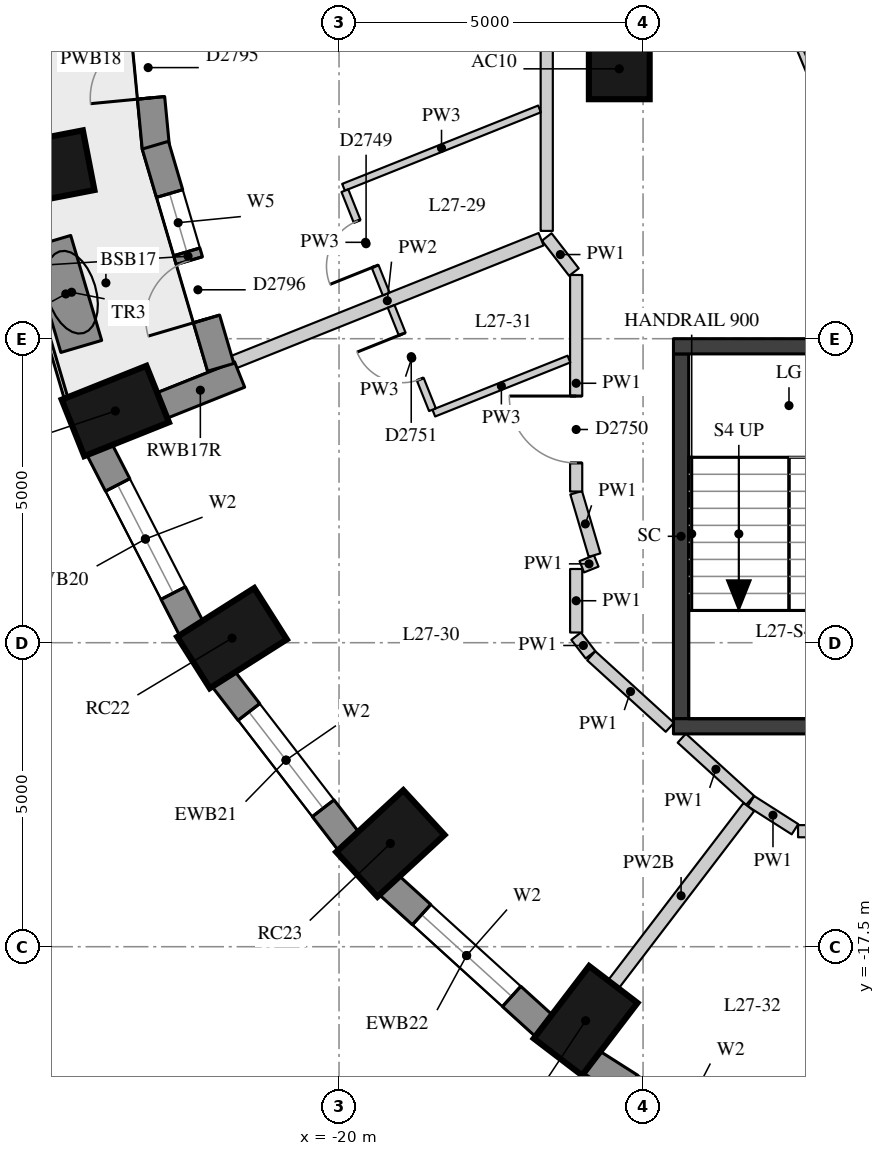
"""IFC4 building model, lengths in metres.
Left out: names, types, materials, properties, quantities, classifications, styles, units other than length and angle.
Written with IfcOpenShell. Run it as: python <this file> out.ifc"""

import sys

from ifc_helpers import new_model, si_unit, direction, frame, frame_2d, origin, origin_2d, place, context, subcontext, project, spatial, rectangle, extrude, element, fill, save


model = new_model("IFC4")
c1 = context("Model", 3, precision=1e-05, world=origin(), true_north=direction((0.0, 1.0)))
c2 = subcontext(c1, "Body", "Model", "MODEL_VIEW")
j1 = project(units=[si_unit("LENGTHUNIT", "METRE"), si_unit("PLANEANGLEUNIT", "RADIAN")], contexts=[c1])
p1 = place(None, origin())
s1 = spatial("IfcSite", under=j1, at=p1, CompositionType="ELEMENT")
p2 = place(p1, origin())
s2 = spatial("IfcBuilding", under=s1, at=p2, CompositionType="ELEMENT")
p3 = place(p2, frame((0.0, 0.0, 98.8)))
s3 = spatial("IfcBuildingStorey", under=s2, at=p3, CompositionType="ELEMENT", Elevation=98.8)
for number, where, z_axis, x_axis in (
    (1, (-24.854, -4.707, 0.0), (0.0, 0.0, 1.0), (-0.982, -0.19, 0.0)),
    (2, (-23.679, -8.689, 0.0), (0.0, 0.0, 1.0), (-0.929, -0.371, 0.0)),
    (3, (-21.76, -12.425, 0.0), (0.0, 0.0, 1.0), (-0.845, -0.536, 0.0)),
    (4, (-19.156, -15.802, 0.0), (0.0, 0.0, 1.0), (-0.735, -0.678, 0.0)),
    (5, (-15.945, -18.717, 0.0), (0.0, 0.0, 1.0), (-0.607, -0.795, 0.0)),
):
    element("IfcColumn", number, at=place(p3, frame(where, z_axis=z_axis, x_axis=x_axis)), inside=s3, PredefinedType="COLUMN", context=c2, shape_type="SweptSolid", body=[
        extrude(rectangle(XDim=1.5, YDim=1.0, at=origin_2d()), origin(), (0.0, 0.0, 1.0), 3.3),
    ])
p4 = place(p3, frame((-15.391, -3.062, 0.0), z_axis=(0.0, 0.0, 1.0), x_axis=(1.0, 0.0, 0.0)))
e6 = element("IfcColumn", 6, at=p4, inside=s3, PredefinedType="COLUMN", context=c2, shape_type="SweptSolid", body=[
    extrude(rectangle(XDim=1.0, YDim=1.0, at=origin_2d()), origin(), (0.0, 0.0, 1.0), 3.3),
])
p5 = place(p3, frame((-23.945, -9.312, 0.0), z_axis=(0.0, 0.0, 1.0), x_axis=(0.456828186229, -0.889554949549, 0.0)))
e7 = element("IfcWall", 7, at=p5, inside=s3, PredefinedType="SOLIDWALL", context=c2, shape_type="SweptSolid", body=[
    extrude(rectangle(XDim=3.333, YDim=0.45, at=frame_2d((1.667, 0.0))), origin(), (0.0, 0.0, 1.0), 3.02),
])
p6 = place(p5, frame((0.666, 0.0, 0.4)))
e8 = element("IfcOpeningElement", 8, at=p6, cuts=e7, PredefinedType="OPENING", context=c2, shape_type="SweptSolid", body=[
    extrude(rectangle(XDim=2.0, YDim=1.75, at=frame_2d((1.0, 0.875))), frame((0.0, 0.235, 0.0), z_axis=(0.0, -1.0, 0.0), x_axis=(1.0, 0.0, 0.0)), (0.0, 0.0, 1.0), 0.47),
])
p7 = place(p3, frame((-21.908, -13.087, 0.0), z_axis=(0.0, 0.0, 1.0), x_axis=(0.610693945156, -0.791866721961, 0.0)))
e9 = element("IfcWall", 9, at=p7, inside=s3, PredefinedType="SOLIDWALL", context=c2, shape_type="SweptSolid", body=[
    extrude(rectangle(XDim=3.395, YDim=0.45, at=frame_2d((1.697, 0.0))), origin(), (0.0, 0.0, 1.0), 3.02),
])
p8 = place(p7, frame((0.697, 0.0, 0.4)))
e10 = element("IfcOpeningElement", 10, at=p8, cuts=e9, PredefinedType="OPENING", context=c2, shape_type="SweptSolid", body=[
    extrude(rectangle(XDim=2.0, YDim=1.75, at=frame_2d((1.0, 0.875))), frame((0.0, 0.235, 0.0), z_axis=(0.0, -1.0, 0.0), x_axis=(1.0, 0.0, 0.0)), (0.0, 0.0, 1.0), 0.47),
])
p9 = place(p3, frame((-19.184, -16.481, 0.0), z_axis=(0.0, 0.0, 1.0), x_axis=(0.740364106106, -0.672206062446, 0.0)))
e11 = element("IfcWall", 11, at=p9, inside=s3, PredefinedType="SOLIDWALL", context=c2, shape_type="SweptSolid", body=[
    extrude(rectangle(XDim=3.464, YDim=0.45, at=frame_2d((1.732, 0.0))), origin(), (0.0, 0.0, 1.0), 3.02),
])
p10 = place(p9, frame((0.732, 0.0, 0.4)))
e12 = element("IfcOpeningElement", 12, at=p10, cuts=e11, PredefinedType="OPENING", context=c2, shape_type="SweptSolid", body=[
    extrude(rectangle(XDim=2.0, YDim=1.75, at=frame_2d((1.0, 0.875))), frame((0.0, 0.235, 0.0), z_axis=(0.0, -1.0, 0.0), x_axis=(1.0, 0.0, 0.0)), (0.0, 0.0, 1.0), 0.47),
])
p11 = place(p3, frame((-15.856, -19.392, 0.0), z_axis=(0.0, 0.0, 1.0), x_axis=(0.843891947083, -0.53651317006, 0.0)))
e13 = element("IfcWall", 13, at=p11, inside=s3, PredefinedType="SOLIDWALL", context=c2, shape_type="SweptSolid", body=[
    extrude(rectangle(XDim=3.532, YDim=0.45, at=frame_2d((1.766, 0.0))), origin(), (0.0, 0.0, 1.0), 3.02),
])
p12 = place(p11, frame((0.766, 0.0, 0.4)))
e14 = element("IfcOpeningElement", 14, at=p12, cuts=e13, PredefinedType="OPENING", context=c2, shape_type="SweptSolid", body=[
    extrude(rectangle(XDim=2.0, YDim=1.75, at=frame_2d((1.0, 0.875))), frame((0.0, 0.235, 0.0), z_axis=(0.0, -1.0, 0.0), x_axis=(1.0, 0.0, 0.0)), (0.0, 0.0, 1.0), 0.47),
])
p13 = place(p3, frame((-22.926, -8.605, 0.0), z_axis=(0.0, 0.0, 1.0), x_axis=(0.928549333349, 0.371209018665, 0.0)))
e15 = element("IfcWall", 15, at=p13, inside=s3, PredefinedType="SOLIDWALL", context=c2, shape_type="SweptSolid", body=[
    extrude(rectangle(XDim=1.39, YDim=0.45, at=frame_2d((0.695, 0.0))), origin(), (0.0, 0.0, 1.0), 3.02),
])
p14 = place(p3, frame((-23.376, -0.578, 0.0), z_axis=(0.0, 0.0, 1.0), x_axis=(0.095646267275, -0.995415386437, 0.0)))
e16 = element("IfcWall", 16, at=p14, inside=s3, PredefinedType="SOLIDWALL", context=c2, shape_type="SweptSolid", body=[
    extrude(rectangle(XDim=3.798, YDim=0.45, at=frame_2d((1.899, 0.0))), origin(), (0.0, 0.0, 1.0), 3.02),
])
p15 = place(p14, frame((0.824, 0.0, 0.4)))
e17 = element("IfcOpeningElement", 17, at=p15, cuts=e16, PredefinedType="OPENING", context=c2, shape_type="SweptSolid", body=[
    extrude(rectangle(XDim=1.0, YDim=1.75, at=frame_2d((0.5, 0.875))), frame((0.0, 0.235, 0.0), z_axis=(0.0, -1.0, 0.0), x_axis=(1.0, 0.0, 0.0)), (0.0, 0.0, 1.0), 0.47),
])
p16 = place(p14, frame((1.974, 0.0, 0.0)))
e18 = element("IfcOpeningElement", 18, at=p16, cuts=e16, PredefinedType="OPENING", context=c2, shape_type="SweptSolid", body=[
    extrude(rectangle(XDim=1.0, YDim=2.15, at=frame_2d((0.5, 1.075))), frame((0.0, 0.235, 0.0), z_axis=(0.0, -1.0, 0.0), x_axis=(1.0, 0.0, 0.0)), (0.0, 0.0, 1.0), 0.47),
])
p17 = place(p3, frame((-23.021, -4.317, 0.0), z_axis=(0.0, 0.0, 1.0), x_axis=(0.282391916129, -0.959299122123, 0.0)))
e19 = element("IfcWall", 19, at=p17, inside=s3, PredefinedType="SOLIDWALL", context=c2, shape_type="SweptSolid", body=[
    extrude(rectangle(XDim=3.808, YDim=0.45, at=frame_2d((1.904, 0.0))), origin(), (0.0, 0.0, 1.0), 3.02),
])
p18 = place(p17, frame((0.829, 0.0, 0.4)))
e20 = element("IfcOpeningElement", 20, at=p18, cuts=e19, PredefinedType="OPENING", context=c2, shape_type="SweptSolid", body=[
    extrude(rectangle(XDim=1.0, YDim=1.75, at=frame_2d((0.5, 0.875))), frame((0.0, 0.235, 0.0), z_axis=(0.0, -1.0, 0.0), x_axis=(1.0, 0.0, 0.0)), (0.0, 0.0, 1.0), 0.47),
])
p19 = place(p17, frame((1.979, 0.0, 0.0)))
e21 = element("IfcOpeningElement", 21, at=p19, cuts=e19, PredefinedType="OPENING", context=c2, shape_type="SweptSolid", body=[
    extrude(rectangle(XDim=1.0, YDim=2.15, at=frame_2d((0.5, 1.075))), frame((0.0, 0.235, 0.0), z_axis=(0.0, -1.0, 0.0), x_axis=(1.0, 0.0, 0.0)), (0.0, 0.0, 1.0), 0.47),
])
p20 = place(p3, frame((-24.749, -5.901, 0.0), z_axis=(0.0, 0.0, 1.0), x_axis=(0.283076786659, -0.959097248904, 0.0)))
e22 = element("IfcWall", 22, at=p20, inside=s3, PredefinedType="USERDEFINED", context=c2, shape_type="SweptSolid", body=[
    extrude(rectangle(XDim=1.8, YDim=0.7, at=frame_2d((0.9, 0.0))), origin(), (0.0, 0.0, 1.0), 0.75),
])
p21 = place(p3, frame((-14.375, -13.75, -0.28), z_axis=(0.0, 0.0, 1.0), x_axis=(0.0, 1.0, 0.0)))
e23 = element("IfcWall", 23, at=p21, inside=s3, PredefinedType="SHEAR", context=c2, shape_type="SweptSolid", body=[
    extrude(rectangle(XDim=6.0, YDim=0.25, at=frame_2d((3.0, 0.0))), origin(), (0.0, 0.0, 1.0), 3.3),
])
for number, where, z_axis, x_axis in (
    (24, (-14.5, -7.625, -0.28), (0.0, 0.0, 1.0), (1.0, 0.0, 0.0)),
    (25, (-14.5, -13.875, -0.28), (0.0, 0.0, 1.0), (1.0, 0.0, 0.0)),
):
    element("IfcWall", number, at=place(p3, frame(where, z_axis=z_axis, x_axis=x_axis)), inside=s3, PredefinedType="SHEAR", context=c2, shape_type="SweptSolid", body=[
        extrude(rectangle(XDim=5.2, YDim=0.25, at=frame_2d((2.6, 0.0))), origin(), (0.0, 0.0, 1.0), 3.3),
    ])
p22 = place(p3, frame((-14.56, -13.891, 0.0), z_axis=(0.0, 0.0, 1.0), x_axis=(-0.739440483737, 0.673221932954, 0.0)))
e26 = element("IfcWall", 26, at=p22, inside=s3, PredefinedType="PARTITIONING", context=c2, shape_type="SweptSolid", body=[
    extrude(rectangle(XDim=1.748, YDim=0.2, at=frame_2d((0.874, 0.0))), origin(), (0.0, 0.0, 1.0), 3.02),
])
p23 = place(p3, frame((-15.864, -12.699, 0.0), z_axis=(0.0, 0.0, 1.0), x_axis=(-0.61004607296, 0.792365943782, 0.0)))
e27 = element("IfcWall", 27, at=p23, inside=s3, PredefinedType="PARTITIONING", context=c2, shape_type="SweptSolid", body=[
    extrude(rectangle(XDim=0.387, YDim=0.2, at=frame_2d((0.193, 0.0))), origin(), (0.0, 0.0, 1.0), 3.02),
])
p24 = place(p3, frame((-16.1, -12.332, 0.0), z_axis=(0.0, 0.0, 1.0), x_axis=(0.0, 1.0, 0.0)))
e28 = element("IfcWall", 28, at=p24, inside=s3, PredefinedType="PARTITIONING", context=c2, shape_type="SweptSolid", body=[
    extrude(rectangle(XDim=1.045, YDim=0.2, at=frame_2d((0.522, 0.0))), origin(), (0.0, 0.0, 1.0), 3.02),
])
p25 = place(p3, frame((-16.007, -11.251, 0.0), z_axis=(0.0, 0.0, 1.0), x_axis=(0.928016011931, 0.372540308691, 0.0)))
e29 = element("IfcWall", 29, at=p25, inside=s3, PredefinedType="PARTITIONING", context=c2, shape_type="SweptSolid", body=[
    extrude(rectangle(XDim=0.256, YDim=0.2, at=frame_2d((0.128, 0.0))), origin(), (0.0, 0.0, 1.0), 3.02),
])
p26 = place(p3, frame((-15.798, -11.059, 0.0), z_axis=(0.0, 0.0, 1.0), x_axis=(-0.282883185669, 0.959154368841, 0.0)))
e30 = element("IfcWall", 30, at=p26, inside=s3, PredefinedType="PARTITIONING", context=c2, shape_type="SweptSolid", body=[
    extrude(rectangle(XDim=1.069, YDim=0.2, at=frame_2d((0.535, 0.0))), origin(), (0.0, 0.0, 1.0), 3.02),
])
p27 = place(p3, frame((-16.1, -10.013, 0.0), z_axis=(0.0, 0.0, 1.0), x_axis=(0.0, 1.0, 0.0)))
e31 = element("IfcWall", 31, at=p27, inside=s3, PredefinedType="PARTITIONING", context=c2, shape_type="SweptSolid", body=[
    extrude(rectangle(XDim=3.561, YDim=0.2, at=frame_2d((1.781, 0.0))), origin(), (0.0, 0.0, 1.0), 3.02),
])
p28 = place(p27, frame((0.47, 0.0, 0.0)))
e32 = element("IfcOpeningElement", 32, at=p28, cuts=e31, PredefinedType="OPENING", context=c2, shape_type="SweptSolid", body=[
    extrude(rectangle(XDim=1.1, YDim=2.1, at=frame_2d((0.55, 1.05))), frame((0.0, 0.11, 0.0), z_axis=(0.0, -1.0, 0.0), x_axis=(1.0, 0.0, 0.0)), (0.0, 0.0, 1.0), 0.22),
])
p29 = place(p3, frame((-16.137, -6.405, 0.0), z_axis=(0.0, 0.0, 1.0), x_axis=(-0.612388914667, 0.790556650211, 0.0)))
e33 = element("IfcWall", 33, at=p29, inside=s3, PredefinedType="PARTITIONING", context=c2, shape_type="SweptSolid", body=[
    extrude(rectangle(XDim=0.73, YDim=0.2, at=frame_2d((0.365, 0.0))), origin(), (0.0, 0.0, 1.0), 3.02),
])
p30 = place(p3, frame((-16.584, -5.727, 0.0), z_axis=(0.0, 0.0, 1.0), x_axis=(0.0, 1.0, 0.0)))
e34 = element("IfcWall", 34, at=p30, inside=s3, PredefinedType="PARTITIONING", context=c2, shape_type="SweptSolid", body=[
    extrude(rectangle(XDim=10.354, YDim=0.2, at=frame_2d((5.177, 0.0))), origin(), (0.0, 0.0, 1.0), 3.02),
])
p31 = place(p30, frame((3.439, 0.0, 0.0)))
e35 = element("IfcOpeningElement", 35, at=p31, cuts=e34, PredefinedType="OPENING", context=c2, shape_type="SweptSolid", body=[
    extrude(rectangle(XDim=1.1, YDim=2.1, at=frame_2d((0.55, 1.05))), frame((0.0, 0.11, 0.0), z_axis=(0.0, -1.0, 0.0), x_axis=(1.0, 0.0, 0.0)), (0.0, 0.0, 1.0), 0.22),
])
p32 = place(p3, frame((-8.0, -15.6, 0.0), z_axis=(0.0, 0.0, 1.0), x_axis=(-1.0, 0.0, 0.0)))
e36 = element("IfcWall", 36, at=p32, inside=s3, PredefinedType="PARTITIONING", context=c2, shape_type="SweptSolid", body=[
    extrude(rectangle(XDim=4.451, YDim=0.2, at=frame_2d((2.226, 0.0))), origin(), (0.0, 0.0, 1.0), 3.02),
])
p33 = place(p32, frame((2.442, 0.0, 0.0)))
e37 = element("IfcOpeningElement", 37, at=p33, cuts=e36, PredefinedType="OPENING", context=c2, shape_type="SweptSolid", body=[
    extrude(rectangle(XDim=0.9, YDim=2.1, at=frame_2d((0.45, 1.05))), frame((0.0, 0.11, 0.0), z_axis=(0.0, -1.0, 0.0), x_axis=(1.0, 0.0, 0.0)), (0.0, 0.0, 1.0), 0.22),
])
p34 = place(p3, frame((-12.501, -15.568, 0.0), z_axis=(0.0, 0.0, 1.0), x_axis=(-0.843169167706, 0.537648355926, 0.0)))
e38 = element("IfcWall", 38, at=p34, inside=s3, PredefinedType="PARTITIONING", context=c2, shape_type="SweptSolid", body=[
    extrude(rectangle(XDim=0.858, YDim=0.2, at=frame_2d((0.429, 0.0))), origin(), (0.0, 0.0, 1.0), 3.02),
])
p35 = place(p3, frame((-13.24, -15.093, 0.0), z_axis=(0.0, 0.0, 1.0), x_axis=(-0.739438095557, 0.673224556028, 0.0)))
e39 = element("IfcWall", 39, at=p35, inside=s3, PredefinedType="PARTITIONING", context=c2, shape_type="SweptSolid", body=[
    extrude(rectangle(XDim=1.519, YDim=0.2, at=frame_2d((0.76, 0.0))), origin(), (0.0, 0.0, 1.0), 3.02),
])
p36 = place(p3, frame((-21.736, -7.887, 0.0), z_axis=(0.0, 0.0, 1.0), x_axis=(0.928513770625, 0.371297963583, 0.0)))
e40 = element("IfcWall", 40, at=p36, inside=s3, PredefinedType="PARTITIONING", context=c2, shape_type="SweptSolid", body=[
    extrude(rectangle(XDim=5.448, YDim=0.22, at=frame_2d((2.724, 0.0))), origin(), (0.0, 0.0, 1.0), 3.02),
])
p37 = place(p3, frame((-15.489, -18.121, 0.0), z_axis=(0.0, 0.0, 1.0), x_axis=(0.607082337972, 0.794638933681, 0.0)))
e41 = element("IfcWall", 41, at=p37, inside=s3, PredefinedType="PARTITIONING", context=c2, shape_type="SweptSolid", body=[
    extrude(rectangle(XDim=3.672, YDim=0.22, at=frame_2d((1.836, 0.0))), origin(), (0.0, 0.0, 1.0), 2.57),
])
p38 = place(p3, frame((-16.703, -3.721, 0.0), z_axis=(0.0, 0.0, 1.0), x_axis=(-0.928539725362, -0.371233051362, 0.0)))
e42 = element("IfcWall", 42, at=p38, inside=s3, PredefinedType="PARTITIONING", context=c2, shape_type="SweptSolid", body=[
    extrude(rectangle(XDim=3.472, YDim=0.12, at=frame_2d((1.736, 0.0))), origin(), (0.0, 0.0, 1.0), 3.02),
])
p39 = place(p3, frame((-16.219, -7.835, 0.0), z_axis=(0.0, 0.0, 1.0), x_axis=(-0.928532951542, -0.371249993806, 0.0)))
e43 = element("IfcWall", 43, at=p39, inside=s3, PredefinedType="PARTITIONING", context=c2, shape_type="SweptSolid", body=[
    extrude(rectangle(XDim=2.394, YDim=0.12, at=frame_2d((1.197, 0.0))), origin(), (0.0, 0.0, 1.0), 3.02),
])
p40 = place(p3, frame((-19.904, -5.065, 0.0), z_axis=(0.0, 0.0, 1.0), x_axis=(0.371275666236, -0.92852268667, 0.0)))
e44 = element("IfcWall", 44, at=p40, inside=s3, PredefinedType="PARTITIONING", context=c2, shape_type="SweptSolid", body=[
    extrude(rectangle(XDim=1.83, YDim=0.12, at=frame_2d((0.915, 0.0))), origin(), (0.0, 0.0, 1.0), 3.02),
])
p41 = place(p40, frame((0.54, 0.0, 0.0)))
e45 = element("IfcOpeningElement", 45, at=p41, cuts=e44, PredefinedType="OPENING", context=c2, shape_type="SweptSolid", body=[
    extrude(rectangle(XDim=0.8, YDim=2.1, at=frame_2d((0.4, 1.05))), frame((0.0, 0.07, 0.0), z_axis=(0.0, -1.0, 0.0), x_axis=(1.0, 0.0, 0.0)), (0.0, 0.0, 1.0), 0.14),
])
p42 = place(p3, frame((-18.464, -8.668, 0.0), z_axis=(0.0, 0.0, 1.0), x_axis=(-0.371275666236, 0.92852268667, 0.0)))
e46 = element("IfcWall", 46, at=p42, inside=s3, PredefinedType="PARTITIONING", context=c2, shape_type="SweptSolid", body=[
    extrude(rectangle(XDim=1.83, YDim=0.12, at=frame_2d((0.915, 0.0))), origin(), (0.0, 0.0, 1.0), 3.02),
])
p43 = place(p42, frame((0.54, 0.0, 0.0)))
e47 = element("IfcOpeningElement", 47, at=p43, cuts=e46, PredefinedType="OPENING", context=c2, shape_type="SweptSolid", body=[
    extrude(rectangle(XDim=0.8, YDim=2.1, at=frame_2d((0.4, 1.05))), frame((0.0, 0.07, 0.0), z_axis=(0.0, -1.0, 0.0), x_axis=(1.0, 0.0, 0.0)), (0.0, 0.0, 1.0), 0.14),
])
p44 = place(p3, frame((-11.927, -3.927, 0.0), z_axis=(0.0, 0.0, 1.0), x_axis=(-0.382730523909, 0.923860025149, 0.0)))
e48 = element("IfcWall", 48, at=p44, inside=s3, PredefinedType="PARTITIONING", context=c2, shape_type="SweptSolid", body=[
    extrude(rectangle(XDim=4.251, YDim=0.1, at=frame_2d((2.125, 0.0))), origin(), (0.0, 0.0, 1.0), 3.02),
])
p45 = place(p6, origin())
e49 = element("IfcWindow", 49, at=p45, inside=s3, PartitioningType="SINGLE_PANEL", PredefinedType="WINDOW", context=c2, shape_type="SweptSolid", body=[
    extrude(rectangle(XDim=2.0, YDim=1.75, at=frame_2d((1.0, 0.875))), frame((0.0, 0.035, 0.0), z_axis=(0.0, -1.0, 0.0), x_axis=(1.0, 0.0, 0.0)), (0.0, 0.0, 1.0), 0.06),
])
fill(e8, e49)
p46 = place(p8, origin())
e50 = element("IfcWindow", 50, at=p46, inside=s3, PartitioningType="SINGLE_PANEL", PredefinedType="WINDOW", context=c2, shape_type="SweptSolid", body=[
    extrude(rectangle(XDim=2.0, YDim=1.75, at=frame_2d((1.0, 0.875))), frame((0.0, 0.035, 0.0), z_axis=(0.0, -1.0, 0.0), x_axis=(1.0, 0.0, 0.0)), (0.0, 0.0, 1.0), 0.06),
])
fill(e10, e50)
p47 = place(p10, origin())
e51 = element("IfcWindow", 51, at=p47, inside=s3, PartitioningType="SINGLE_PANEL", PredefinedType="WINDOW", context=c2, shape_type="SweptSolid", body=[
    extrude(rectangle(XDim=2.0, YDim=1.75, at=frame_2d((1.0, 0.875))), frame((0.0, 0.035, 0.0), z_axis=(0.0, -1.0, 0.0), x_axis=(1.0, 0.0, 0.0)), (0.0, 0.0, 1.0), 0.06),
])
fill(e12, e51)
p48 = place(p16, frame((1.0, 0.0, 0.0), z_axis=(0.0, 0.0, 1.0), x_axis=(-1.0, 0.0, 0.0)))
e52 = element("IfcDoor", 52, at=p48, inside=s3, OperationType="SINGLE_SWING_LEFT", PredefinedType="DOOR", context=c2, shape_type="SweptSolid", body=[
    extrude(rectangle(XDim=1.0, YDim=2.15, at=frame_2d((0.5, 1.075))), frame((0.0, 0.075, 0.0), z_axis=(0.0, -1.0, 0.0), x_axis=(1.0, 0.0, 0.0)), (0.0, 0.0, 1.0), 0.05),
])
fill(e18, e52)
p49 = place(p18, origin())
e53 = element("IfcWindow", 53, at=p49, inside=s3, PartitioningType="SINGLE_PANEL", PredefinedType="WINDOW", context=c2, shape_type="SweptSolid", body=[
    extrude(rectangle(XDim=1.0, YDim=1.75, at=frame_2d((0.5, 0.875))), frame((0.0, 0.035, 0.0), z_axis=(0.0, -1.0, 0.0), x_axis=(1.0, 0.0, 0.0)), (0.0, 0.0, 1.0), 0.06),
])
fill(e20, e53)
p50 = place(p19, frame((1.0, 0.0, 0.0), z_axis=(0.0, 0.0, 1.0), x_axis=(-1.0, 0.0, 0.0)))
e54 = element("IfcDoor", 54, at=p50, inside=s3, OperationType="SINGLE_SWING_LEFT", PredefinedType="DOOR", context=c2, shape_type="SweptSolid", body=[
    extrude(rectangle(XDim=1.0, YDim=2.15, at=frame_2d((0.5, 1.075))), frame((0.0, 0.075, 0.0), z_axis=(0.0, -1.0, 0.0), x_axis=(1.0, 0.0, 0.0)), (0.0, 0.0, 1.0), 0.05),
])
fill(e21, e54)
p51 = place(p41, origin())
e55 = element("IfcDoor", 55, at=p51, inside=s3, OperationType="SINGLE_SWING_LEFT", PredefinedType="DOOR", context=c2, shape_type="SweptSolid", body=[
    extrude(rectangle(XDim=0.8, YDim=2.1, at=frame_2d((0.4, 1.05))), frame((0.0, 0.025, 0.0), z_axis=(0.0, -1.0, 0.0), x_axis=(1.0, 0.0, 0.0)), (0.0, 0.0, 1.0), 0.05),
])
fill(e45, e55)
p52 = place(p28, origin())
e56 = element("IfcDoor", 56, at=p52, inside=s3, OperationType="SINGLE_SWING_RIGHT", PredefinedType="DOOR", context=c2, shape_type="SweptSolid", body=[
    extrude(rectangle(XDim=1.1, YDim=2.1, at=frame_2d((0.55, 1.05))), frame((0.0, 0.025, 0.0), z_axis=(0.0, -1.0, 0.0), x_axis=(1.0, 0.0, 0.0)), (0.0, 0.0, 1.0), 0.05),
])
fill(e32, e56)
p53 = place(p43, origin())
e57 = element("IfcDoor", 57, at=p53, inside=s3, OperationType="SINGLE_SWING_RIGHT", PredefinedType="DOOR", context=c2, shape_type="SweptSolid", body=[
    extrude(rectangle(XDim=0.8, YDim=2.1, at=frame_2d((0.4, 1.05))), frame((0.0, 0.025, 0.0), z_axis=(0.0, -1.0, 0.0), x_axis=(1.0, 0.0, 0.0)), (0.0, 0.0, 1.0), 0.05),
])
fill(e47, e57)
save(model, sys.argv[1])
